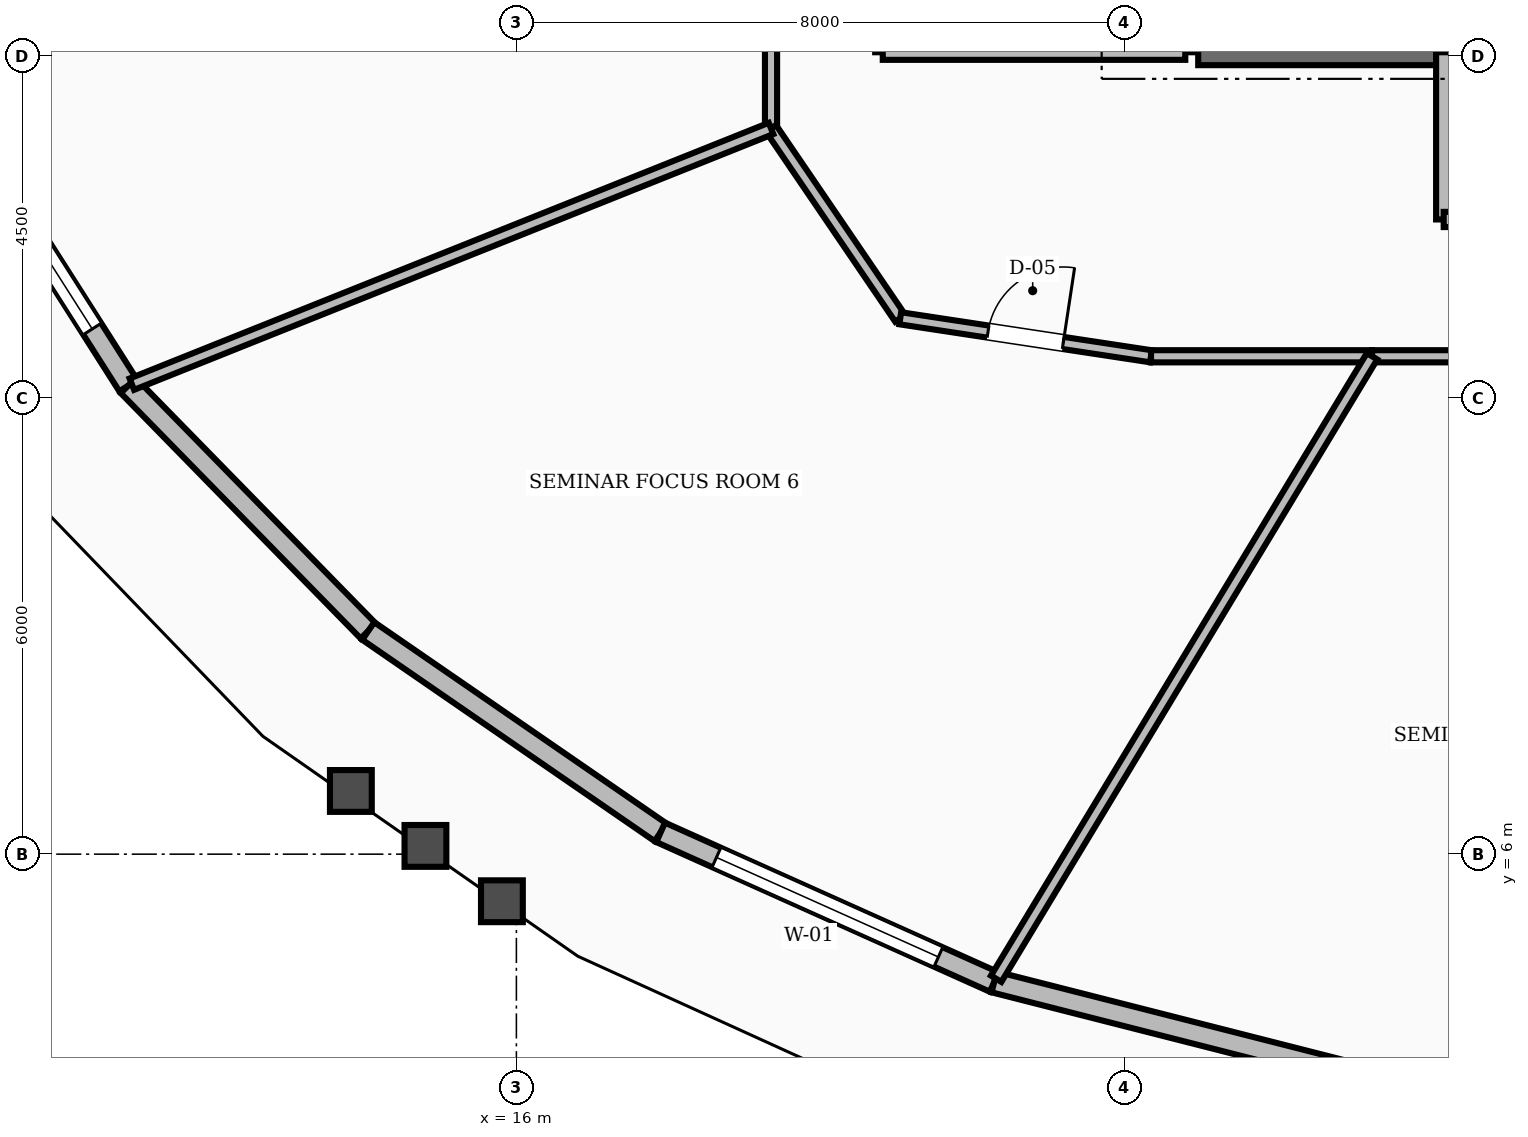
"""IFC4 building model, lengths in metres.
Left out: names, types, materials, properties, quantities, classifications, styles, units other than length and angle.
Written with IfcOpenShell. Run it as: python <this file> out.ifc"""

import sys

from ifc_helpers import new_model, si_unit, direction, frame, frame_2d, origin, place, context, subcontext, project, spatial, rectangle, extrude, element, fill, save


model = new_model("IFC4")
c1 = context("Model", 3, precision=1e-05, world=origin(), true_north=direction((0.0, 1.0)))
c2 = subcontext(c1, "Body", "Model", "MODEL_VIEW")
j1 = project(units=[si_unit("LENGTHUNIT", "METRE"), si_unit("PLANEANGLEUNIT", "RADIAN")], contexts=[c1])
p1 = place(None, origin())
s1 = spatial("IfcSite", under=j1, at=p1, CompositionType="ELEMENT")
p2 = place(p1, origin())
s2 = spatial("IfcBuilding", under=s1, at=p2, CompositionType="ELEMENT")
p3 = place(p2, frame((0.0, 0.0, 185.6)))
s3 = spatial("IfcBuildingStorey", under=s2, at=p3, CompositionType="ELEMENT", Elevation=185.6)
p4 = place(p3, frame((24.97, 16.55, 0.0), z_axis=(0.0, 0.0, 1.0), x_axis=(1.0, 0.0, 0.0)))
e1 = element("IfcWall", 1, at=p4, inside=s3, PredefinedType="SHEAR", context=c2, shape_type="SweptSolid", body=[
    extrude(rectangle(XDim=3.23, YDim=0.34, at=frame_2d((1.615, 0.0))), origin(), (0.0, 0.0, 1.0), 3.6),
])
p5 = place(p3, frame((8.549, 15.847, 0.0), z_axis=(0.0, 0.0, 1.0), x_axis=(0.537186580304, -0.843463441971, 0.0)))
e2 = element("IfcWall", 2, at=p5, inside=s3, PredefinedType="STANDARD", context=c2, shape_type="SweptSolid", body=[
    extrude(rectangle(XDim=4.367, YDim=0.28, at=frame_2d((2.183, 0.0))), origin(), (0.0, 0.0, 1.0), 2.82),
])
p6 = place(p5, frame((0.883, 0.0, 0.8)))
e3 = element("IfcOpeningElement", 3, at=p6, cuts=e2, PredefinedType="OPENING", context=c2, shape_type="SweptSolid", body=[
    extrude(rectangle(XDim=2.6, YDim=1.65, at=frame_2d((1.3, 0.825))), frame((0.0, 0.15, 0.0), z_axis=(0.0, -1.0, 0.0), x_axis=(1.0, 0.0, 0.0)), (0.0, 0.0, 1.0), 0.3),
])
p7 = place(p3, frame((10.895, 12.164, 0.0), z_axis=(0.0, 0.0, 1.0), x_axis=(0.699140974596, -0.714983844322, 0.0)))
e4 = element("IfcWall", 4, at=p7, inside=s3, PredefinedType="STANDARD", context=c2, shape_type="SweptSolid", body=[
    extrude(rectangle(XDim=4.515, YDim=0.28, at=frame_2d((2.258, 0.0))), origin(), (0.0, 0.0, 1.0), 2.82),
])
p8 = place(p3, frame((14.051, 8.936, 0.0), z_axis=(0.0, 0.0, 1.0), x_axis=(0.823542873284, -0.567254031157, 0.0)))
e5 = element("IfcWall", 5, at=p8, inside=s3, PredefinedType="STANDARD", context=c2, shape_type="SweptSolid", body=[
    extrude(rectangle(XDim=4.671, YDim=0.28, at=frame_2d((2.335, 0.0))), origin(), (0.0, 0.0, 1.0), 2.82),
])
p9 = place(p3, frame((17.898, 6.287, 0.0), z_axis=(0.0, 0.0, 1.0), x_axis=(0.91240998906, -0.409277426525, 0.0)))
e6 = element("IfcWall", 6, at=p9, inside=s3, PredefinedType="STANDARD", context=c2, shape_type="SweptSolid", body=[
    extrude(rectangle(XDim=4.81, YDim=0.28, at=frame_2d((2.405, 0.0))), origin(), (0.0, 0.0, 1.0), 2.82),
])
p10 = place(p9, frame((0.805, 0.0, 0.8)))
e7 = element("IfcOpeningElement", 7, at=p10, cuts=e6, PredefinedType="OPENING", context=c2, shape_type="SweptSolid", body=[
    extrude(rectangle(XDim=3.2, YDim=1.65, at=frame_2d((1.6, 0.825))), frame((0.0, 0.15, 0.0), z_axis=(0.0, -1.0, 0.0), x_axis=(1.0, 0.0, 0.0)), (0.0, 0.0, 1.0), 0.3),
])
p11 = place(p3, frame((22.286, 4.318, 0.0), z_axis=(0.0, 0.0, 1.0), x_axis=(0.969081190832, -0.246742062842, 0.0)))
e8 = element("IfcWall", 8, at=p11, inside=s3, PredefinedType="STANDARD", context=c2, shape_type="SweptSolid", body=[
    extrude(rectangle(XDim=4.914, YDim=0.28, at=frame_2d((2.457, 0.0))), origin(), (0.0, 0.0, 1.0), 2.82),
])
p12 = place(p3, frame((27.048, 3.106, 0.0), z_axis=(0.0, 0.0, 1.0), x_axis=(0.999536908445, 0.030429733092, 0.0)))
e9 = element("IfcWall", 9, at=p12, inside=s3, PredefinedType="STANDARD", context=c2, shape_type="SweptSolid", body=[
    extrude(rectangle(XDim=5.047, YDim=0.28, at=frame_2d((2.523, 0.0))), origin(), (0.0, 0.0, 1.0), 2.82),
])
p13 = place(p3, frame((20.82, 16.55, 0.0), z_axis=(0.0, 0.0, 1.0), x_axis=(1.0, 0.0, 0.0)))
e10 = element("IfcWall", 10, at=p13, inside=s3, PredefinedType="SOLIDWALL", context=c2, shape_type="SweptSolid", body=[
    extrude(rectangle(XDim=3.98, YDim=0.2, at=frame_2d((1.99, 0.0))), origin(), (0.0, 0.0, 1.0), 2.8),
])
p14 = place(p3, frame((28.2, 14.35, 0.0), z_axis=(0.0, 0.0, 1.0), x_axis=(0.0, 1.0, 0.0)))
e11 = element("IfcWall", 11, at=p14, inside=s3, PredefinedType="SOLIDWALL", context=c2, shape_type="SweptSolid", body=[
    extrude(rectangle(XDim=2.2, YDim=0.2, at=frame_2d((1.1, 0.0))), origin(), (0.0, 0.0, 1.0), 2.8),
])
p15 = place(p3, frame((28.2, 14.35, 0.0), z_axis=(0.0, 0.0, 1.0), x_axis=(1.0, 0.0, 0.0)))
e12 = element("IfcWall", 12, at=p15, inside=s3, PredefinedType="SOLIDWALL", context=c2, shape_type="SweptSolid", body=[
    extrude(rectangle(XDim=7.6, YDim=0.2, at=frame_2d((3.8, 0.0))), origin(), (0.0, 0.0, 1.0), 2.8),
])
p16 = place(p15, frame((3.2, 0.0, 0.0)))
e13 = element("IfcOpeningElement", 13, at=p16, cuts=e12, PredefinedType="OPENING", context=c2, shape_type="SweptSolid", body=[
    extrude(rectangle(XDim=1.2, YDim=2.1, at=frame_2d((0.6, 1.05))), frame((0.0, 0.11, 0.0), z_axis=(0.0, -1.0, 0.0), x_axis=(1.0, 0.0, 0.0)), (0.0, 0.0, 1.0), 0.22),
])
p17 = place(p3, frame((19.35, 18.76, 0.0), z_axis=(0.0, 0.0, 1.0), x_axis=(0.0, -1.0, 0.0)))
e14 = element("IfcWall", 14, at=p17, inside=s3, PredefinedType="SOLIDWALL", context=c2, shape_type="SweptSolid", body=[
    extrude(rectangle(XDim=3.213, YDim=0.16, at=frame_2d((1.606, 0.0))), origin(), (0.0, 0.0, 1.0), 2.8),
])
p18 = place(p3, frame((19.35, 15.548, 0.0), z_axis=(0.0, 0.0, 1.0), x_axis=(0.562674669208, -0.826678423955, 0.0)))
e15 = element("IfcWall", 15, at=p18, inside=s3, PredefinedType="SOLIDWALL", context=c2, shape_type="SweptSolid", body=[
    extrude(rectangle(XDim=3.021, YDim=0.16, at=frame_2d((1.511, 0.0))), origin(), (0.0, 0.0, 1.0), 2.8),
])
p19 = place(p3, frame((21.05, 13.05, 0.0), z_axis=(0.0, 0.0, 1.0), x_axis=(0.988710906508, -0.149835721217, 0.0)))
e16 = element("IfcWall", 16, at=p19, inside=s3, PredefinedType="SOLIDWALL", context=c2, shape_type="SweptSolid", body=[
    extrude(rectangle(XDim=3.337, YDim=0.16, at=frame_2d((1.668, 0.0))), origin(), (0.0, 0.0, 1.0), 2.8),
])
p20 = place(p19, frame((1.168, 0.0, 0.0)))
e17 = element("IfcOpeningElement", 17, at=p20, cuts=e16, PredefinedType="OPENING", context=c2, shape_type="SweptSolid", body=[
    extrude(rectangle(XDim=1.0, YDim=2.1, at=frame_2d((0.5, 1.05))), frame((0.0, 0.09, 0.0), z_axis=(0.0, -1.0, 0.0), x_axis=(1.0, 0.0, 0.0)), (0.0, 0.0, 1.0), 0.18),
])
p21 = place(p3, frame((24.349, 12.55, 0.0), z_axis=(0.0, 0.0, 1.0), x_axis=(1.0, 0.0, 0.0)))
e18 = element("IfcWall", 18, at=p21, inside=s3, PredefinedType="SOLIDWALL", context=c2, shape_type="SweptSolid", body=[
    extrude(rectangle(XDim=2.908, YDim=0.16, at=frame_2d((1.454, 0.0))), origin(), (0.0, 0.0, 1.0), 2.8),
])
p22 = place(p3, frame((27.257, 12.55, 0.0), z_axis=(0.0, 0.0, 1.0), x_axis=(1.0, 0.0, 0.0)))
e19 = element("IfcWall", 19, at=p22, inside=s3, PredefinedType="SOLIDWALL", context=c2, shape_type="SweptSolid", body=[
    extrude(rectangle(XDim=2.465, YDim=0.16, at=frame_2d((1.232, 0.0))), origin(), (0.0, 0.0, 1.0), 2.8),
])
p23 = place(p3, frame((19.35, 15.548, 0.0), z_axis=(0.0, 0.0, 1.0), x_axis=(-0.92844508487, -0.371469681645, 0.0)))
e20 = element("IfcWall", 20, at=p23, inside=s3, PredefinedType="SOLIDWALL", context=c2, shape_type="SweptSolid", body=[
    extrude(rectangle(XDim=9.057, YDim=0.16, at=frame_2d((4.529, 0.0))), origin(), (0.0, 0.0, 1.0), 2.8),
])
p24 = place(p3, frame((27.257, 12.55, 0.0), z_axis=(0.0, 0.0, 1.0), x_axis=(-0.516936849409, -0.856023535729, 0.0)))
e21 = element("IfcWall", 21, at=p24, inside=s3, PredefinedType="SOLIDWALL", context=c2, shape_type="SweptSolid", body=[
    extrude(rectangle(XDim=9.567, YDim=0.16, at=frame_2d((4.783, 0.0))), origin(), (0.0, 0.0, 1.0), 2.8),
])
p25 = place(p6, origin())
e22 = element("IfcWindow", 22, at=p25, inside=s3, PartitioningType="SINGLE_PANEL", PredefinedType="WINDOW", context=c2, shape_type="SweptSolid", body=[
    extrude(rectangle(XDim=2.6, YDim=1.65, at=frame_2d((1.3, 0.825))), frame((0.0, 0.03, 0.0), z_axis=(0.0, -1.0, 0.0), x_axis=(1.0, 0.0, 0.0)), (0.0, 0.0, 1.0), 0.06),
])
fill(e3, e22)
p26 = place(p10, origin())
e23 = element("IfcWindow", 23, at=p26, inside=s3, PartitioningType="SINGLE_PANEL", PredefinedType="WINDOW", context=c2, shape_type="SweptSolid", body=[
    extrude(rectangle(XDim=3.2, YDim=1.65, at=frame_2d((1.6, 0.825))), frame((0.0, 0.03, 0.0), z_axis=(0.0, -1.0, 0.0), x_axis=(1.0, 0.0, 0.0)), (0.0, 0.0, 1.0), 0.06),
])
fill(e7, e23)
p27 = place(p20, origin())
e24 = element("IfcDoor", 24, at=p27, inside=s3, OperationType="SINGLE_SWING_RIGHT", PredefinedType="DOOR", context=c2, shape_type="SweptSolid", body=[
    extrude(rectangle(XDim=1.0, YDim=2.1, at=frame_2d((0.5, 1.05))), frame((0.0, 0.025, 0.0), z_axis=(0.0, -1.0, 0.0), x_axis=(1.0, 0.0, 0.0)), (0.0, 0.0, 1.0), 0.05),
])
fill(e17, e24)
save(model, sys.argv[1])
